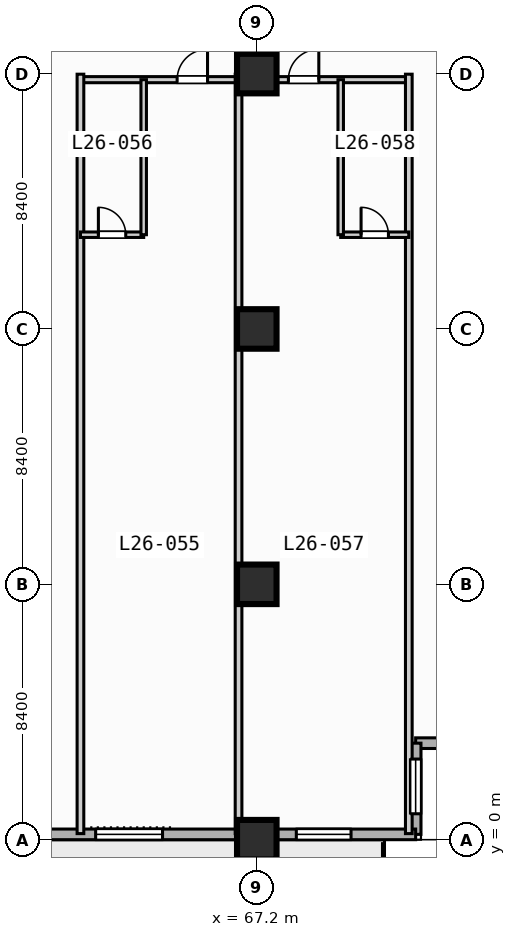
"""IFC4 building model, lengths in metres.
Left out: names, types, materials, properties, quantities, classifications, styles, units other than length and angle.
Written with IfcOpenShell. Run it as: python <this file> out.ifc"""

import sys

from ifc_helpers import new_model, si_unit, direction, frame, frame_2d, origin, origin_2d, place, context, subcontext, project, spatial, rectangle, extrude, element, fill, save


model = new_model("IFC4")
c1 = context("Model", 3, precision=1e-05, world=origin(), true_north=direction((0.0, 1.0)))
c2 = subcontext(c1, "Body", "Model", "MODEL_VIEW")
j1 = project(units=[si_unit("LENGTHUNIT", "METRE"), si_unit("PLANEANGLEUNIT", "RADIAN")], contexts=[c1])
p1 = place(None, origin())
s1 = spatial("IfcSite", under=j1, at=p1, CompositionType="ELEMENT")
p2 = place(p1, origin())
s2 = spatial("IfcBuilding", under=s1, at=p2, CompositionType="ELEMENT")
p3 = place(p2, frame((0.0, 0.0, 111.4)))
s3 = spatial("IfcBuildingStorey", under=s2, at=p3, CompositionType="ELEMENT", Elevation=111.4)
for number, where, z_axis, x_axis in (
    (1, (67.2, 0.0, 0.0), (0.0, 0.0, 1.0), (1.0, 0.0, 0.0)),
    (2, (67.2, 8.4, 0.0), (0.0, 0.0, 1.0), (1.0, 0.0, 0.0)),
    (3, (67.2, 16.8, 0.0), (0.0, 0.0, 1.0), (1.0, 0.0, 0.0)),
    (4, (67.2, 25.2, 0.0), (0.0, 0.0, 1.0), (1.0, 0.0, 0.0)),
):
    element("IfcColumn", number, at=place(p3, frame(where, z_axis=z_axis, x_axis=x_axis)), inside=s3, PredefinedType="COLUMN", context=c2, shape_type="SweptSolid", body=[
        extrude(rectangle(XDim=1.3, YDim=1.3, at=origin_2d()), origin(), (0.0, 0.0, 1.0), 3.8),
    ])
p4 = place(p3, frame((75.425, 3.175, 0.0), z_axis=(0.0, 0.0, 1.0), x_axis=(-1.0, 0.0, 0.0)))
e5 = element("IfcWall", 5, at=p4, inside=s3, PredefinedType="STANDARD", context=c2, shape_type="SweptSolid", body=[
    extrude(rectangle(XDim=3.0, YDim=0.35, at=frame_2d((1.5, 0.0))), origin(), (0.0, 0.0, 1.0), 3.55),
])
p5 = place(p3, frame((72.425, 3.175, 0.0), z_axis=(0.0, 0.0, 1.0), x_axis=(0.0, -1.0, 0.0)))
e6 = element("IfcWall", 6, at=p5, inside=s3, PredefinedType="STANDARD", context=c2, shape_type="SweptSolid", body=[
    extrude(rectangle(XDim=3.0, YDim=0.35, at=frame_2d((1.5, 0.0))), origin(), (0.0, 0.0, 1.0), 3.55),
])
p6 = place(p5, frame((0.522, 0.0, 0.85)))
e7 = element("IfcOpeningElement", 7, at=p6, cuts=e6, PredefinedType="OPENING", context=c2, shape_type="SweptSolid", body=[
    extrude(rectangle(XDim=1.8, YDim=1.8, at=frame_2d((0.9, 0.9))), frame((0.0, 0.185, 0.0), z_axis=(0.0, -1.0, 0.0), x_axis=(1.0, 0.0, 0.0)), (0.0, 0.0, 1.0), 0.37),
])
p7 = place(p3, frame((72.425, 0.175, 0.0), z_axis=(0.0, 0.0, 1.0), x_axis=(-1.0, 0.0, 0.0)))
e8 = element("IfcWall", 8, at=p7, inside=s3, PredefinedType="STANDARD", context=c2, shape_type="SweptSolid", body=[
    extrude(rectangle(XDim=69.25, YDim=0.35, at=frame_2d((34.625, 0.0))), origin(), (0.0, 0.0, 1.0), 3.55),
])
p8 = place(p7, frame((50.725, 0.0, 0.0)))
e9 = element("IfcOpeningElement", 9, at=p8, cuts=e8, PredefinedType="OPENING", context=c2, shape_type="SweptSolid", body=[
    extrude(rectangle(XDim=1.4, YDim=2.2, at=frame_2d((0.7, 1.1))), frame((0.0, 0.185, 0.0), z_axis=(0.0, -1.0, 0.0), x_axis=(1.0, 0.0, 0.0)), (0.0, 0.0, 1.0), 0.37),
])
p9 = place(p7, frame((58.725, 0.0, 0.85)))
e10 = element("IfcOpeningElement", 10, at=p9, cuts=e8, PredefinedType="OPENING", context=c2, shape_type="SweptSolid", body=[
    extrude(rectangle(XDim=2.2, YDim=1.8, at=frame_2d((1.1, 0.9))), frame((0.0, 0.185, 0.0), z_axis=(0.0, -1.0, 0.0), x_axis=(1.0, 0.0, 0.0)), (0.0, 0.0, 1.0), 0.37),
])
p10 = place(p7, frame((41.925, 0.0, 0.85)))
e11 = element("IfcOpeningElement", 11, at=p10, cuts=e8, PredefinedType="OPENING", context=c2, shape_type="SweptSolid", body=[
    extrude(rectangle(XDim=2.2, YDim=1.8, at=frame_2d((1.1, 0.9))), frame((0.0, 0.185, 0.0), z_axis=(0.0, -1.0, 0.0), x_axis=(1.0, 0.0, 0.0)), (0.0, 0.0, 1.0), 0.37),
])
p11 = place(p7, frame((33.525, 0.0, 0.85)))
e12 = element("IfcOpeningElement", 12, at=p11, cuts=e8, PredefinedType="OPENING", context=c2, shape_type="SweptSolid", body=[
    extrude(rectangle(XDim=2.2, YDim=1.8, at=frame_2d((1.1, 0.9))), frame((0.0, 0.185, 0.0), z_axis=(0.0, -1.0, 0.0), x_axis=(1.0, 0.0, 0.0)), (0.0, 0.0, 1.0), 0.37),
])
p12 = place(p7, frame((25.125, 0.0, 0.85)))
e13 = element("IfcOpeningElement", 13, at=p12, cuts=e8, PredefinedType="OPENING", context=c2, shape_type="SweptSolid", body=[
    extrude(rectangle(XDim=2.2, YDim=1.8, at=frame_2d((1.1, 0.9))), frame((0.0, 0.185, 0.0), z_axis=(0.0, -1.0, 0.0), x_axis=(1.0, 0.0, 0.0)), (0.0, 0.0, 1.0), 0.37),
])
p13 = place(p7, frame((8.325, 0.0, 0.85)))
e14 = element("IfcOpeningElement", 14, at=p13, cuts=e8, PredefinedType="OPENING", context=c2, shape_type="SweptSolid", body=[
    extrude(rectangle(XDim=2.2, YDim=1.8, at=frame_2d((1.1, 0.9))), frame((0.0, 0.185, 0.0), z_axis=(0.0, -1.0, 0.0), x_axis=(1.0, 0.0, 0.0)), (0.0, 0.0, 1.0), 0.37),
])
p14 = place(p7, frame((2.125, 0.0, 0.85)))
e15 = element("IfcOpeningElement", 15, at=p14, cuts=e8, PredefinedType="OPENING", context=c2, shape_type="SweptSolid", body=[
    extrude(rectangle(XDim=1.8, YDim=1.8, at=frame_2d((0.9, 0.9))), frame((0.0, 0.185, 0.0), z_axis=(0.0, -1.0, 0.0), x_axis=(1.0, 0.0, 0.0)), (0.0, 0.0, 1.0), 0.37),
])
p15 = place(p3, frame((61.4, 25.0, 0.0), z_axis=(0.0, 0.0, 1.0), x_axis=(1.0, 0.0, 0.0)))
e16 = element("IfcWall", 16, at=p15, inside=s3, PredefinedType="PARTITIONING", context=c2, shape_type="SweptSolid", body=[
    extrude(rectangle(XDim=10.8, YDim=0.2, at=frame_2d((5.4, 0.0))), origin(), (0.0, 0.0, 1.0), 2.8),
])
p16 = place(p15, frame((3.18, 0.0, 0.0)))
e17 = element("IfcOpeningElement", 17, at=p16, cuts=e16, PredefinedType="OPENING", context=c2, shape_type="SweptSolid", body=[
    extrude(rectangle(XDim=1.0, YDim=2.15, at=frame_2d((0.5, 1.075))), frame((0.0, 0.11, 0.0), z_axis=(0.0, -1.0, 0.0), x_axis=(1.0, 0.0, 0.0)), (0.0, 0.0, 1.0), 0.22),
])
p17 = place(p15, frame((6.84, 0.0, 0.0)))
e18 = element("IfcOpeningElement", 18, at=p17, cuts=e16, PredefinedType="OPENING", context=c2, shape_type="SweptSolid", body=[
    extrude(rectangle(XDim=1.0, YDim=2.15, at=frame_2d((0.5, 1.075))), frame((0.0, 0.11, 0.0), z_axis=(0.0, -1.0, 0.0), x_axis=(1.0, 0.0, 0.0)), (0.0, 0.0, 1.0), 0.22),
])
p18 = place(p3, frame((61.4, 0.2, 0.0), z_axis=(0.0, 0.0, 1.0), x_axis=(0.0, 1.0, 0.0)))
e19 = element("IfcWall", 19, at=p18, inside=s3, PredefinedType="PARTITIONING", context=c2, shape_type="SweptSolid", body=[
    extrude(rectangle(XDim=24.98, YDim=0.22, at=frame_2d((12.49, 0.0))), origin(), (0.0, 0.0, 1.0), 3.55),
])
p19 = place(p3, frame((61.4, 19.9, 0.0), z_axis=(0.0, 0.0, 1.0), x_axis=(1.0, 0.0, 0.0)))
e20 = element("IfcWall", 20, at=p19, inside=s3, PredefinedType="PLUMBINGWALL", context=c2, shape_type="SweptSolid", body=[
    extrude(rectangle(XDim=2.08, YDim=0.18, at=frame_2d((1.04, 0.0))), origin(), (0.0, 0.0, 1.0), 3.55),
])
p20 = place(p19, frame((0.59, 0.0, 0.0)))
e21 = element("IfcOpeningElement", 21, at=p20, cuts=e20, PredefinedType="OPENING", context=c2, shape_type="SweptSolid", body=[
    extrude(rectangle(XDim=0.9, YDim=2.1, at=frame_2d((0.45, 1.05))), frame((0.0, 0.1, 0.0), z_axis=(0.0, -1.0, 0.0), x_axis=(1.0, 0.0, 0.0)), (0.0, 0.0, 1.0), 0.2),
])
p21 = place(p3, frame((63.48, 19.9, 0.0), z_axis=(0.0, 0.0, 1.0), x_axis=(0.0, 1.0, 0.0)))
e22 = element("IfcWall", 22, at=p21, inside=s3, PredefinedType="PLUMBINGWALL", context=c2, shape_type="SweptSolid", body=[
    extrude(rectangle(XDim=5.1, YDim=0.18, at=frame_2d((2.55, 0.0))), origin(), (0.0, 0.0, 1.0), 3.55),
])
for number, where, z_axis, x_axis in (
    (23, (66.6, 0.2, 0.0), (0.0, 0.0, 1.0), (0.0, 1.0, 0.0)),
    (24, (72.2, 0.2, 0.0), (0.0, 0.0, 1.0), (0.0, 1.0, 0.0)),
):
    element("IfcWall", number, at=place(p3, frame(where, z_axis=z_axis, x_axis=x_axis)), inside=s3, PredefinedType="PARTITIONING", context=c2, shape_type="SweptSolid", body=[
        extrude(rectangle(XDim=24.98, YDim=0.22, at=frame_2d((12.49, 0.0))), origin(), (0.0, 0.0, 1.0), 3.55),
    ])
p22 = place(p3, frame((69.96, 19.9, 0.0), z_axis=(0.0, 0.0, 1.0), x_axis=(1.0, 0.0, 0.0)))
e25 = element("IfcWall", 25, at=p22, inside=s3, PredefinedType="PLUMBINGWALL", context=c2, shape_type="SweptSolid", body=[
    extrude(rectangle(XDim=2.24, YDim=0.18, at=frame_2d((1.12, 0.0))), origin(), (0.0, 0.0, 1.0), 3.55),
])
p23 = place(p22, frame((0.67, 0.0, 0.0)))
e26 = element("IfcOpeningElement", 26, at=p23, cuts=e25, PredefinedType="OPENING", context=c2, shape_type="SweptSolid", body=[
    extrude(rectangle(XDim=0.9, YDim=2.1, at=frame_2d((0.45, 1.05))), frame((0.0, 0.1, 0.0), z_axis=(0.0, -1.0, 0.0), x_axis=(1.0, 0.0, 0.0)), (0.0, 0.0, 1.0), 0.2),
])
p24 = place(p3, frame((69.96, 19.9, 0.0), z_axis=(0.0, 0.0, 1.0), x_axis=(0.0, 1.0, 0.0)))
e27 = element("IfcWall", 27, at=p24, inside=s3, PredefinedType="PLUMBINGWALL", context=c2, shape_type="SweptSolid", body=[
    extrude(rectangle(XDim=5.1, YDim=0.18, at=frame_2d((2.55, 0.0))), origin(), (0.0, 0.0, 1.0), 3.55),
])
p25 = place(p6, origin())
e28 = element("IfcWindow", 28, at=p25, inside=s3, PartitioningType="SINGLE_PANEL", PredefinedType="WINDOW", context=c2, shape_type="SweptSolid", body=[
    extrude(rectangle(XDim=1.8, YDim=1.8, at=frame_2d((0.9, 0.9))), frame((0.0, 0.03, 0.0), z_axis=(0.0, -1.0, 0.0), x_axis=(1.0, 0.0, 0.0)), (0.0, 0.0, 1.0), 0.06),
])
fill(e7, e28)
p26 = place(p13, origin())
e29 = element("IfcWindow", 29, at=p26, inside=s3, PartitioningType="SINGLE_PANEL", PredefinedType="WINDOW", context=c2, shape_type="SweptSolid", body=[
    extrude(rectangle(XDim=2.2, YDim=1.8, at=frame_2d((1.1, 0.9))), frame((0.0, 0.03, 0.0), z_axis=(0.0, -1.0, 0.0), x_axis=(1.0, 0.0, 0.0)), (0.0, 0.0, 1.0), 0.06),
])
fill(e14, e29)
p27 = place(p14, origin())
e30 = element("IfcWindow", 30, at=p27, inside=s3, PartitioningType="SINGLE_PANEL", PredefinedType="WINDOW", context=c2, shape_type="SweptSolid", body=[
    extrude(rectangle(XDim=1.8, YDim=1.8, at=frame_2d((0.9, 0.9))), frame((0.0, 0.03, 0.0), z_axis=(0.0, -1.0, 0.0), x_axis=(1.0, 0.0, 0.0)), (0.0, 0.0, 1.0), 0.06),
])
fill(e15, e30)
p28 = place(p16, origin())
e31 = element("IfcDoor", 31, at=p28, inside=s3, OperationType="SINGLE_SWING_RIGHT", PredefinedType="DOOR", context=c2, shape_type="SweptSolid", body=[
    extrude(rectangle(XDim=1.0, YDim=2.15, at=frame_2d((0.5, 1.075))), frame((0.0, 0.025, 0.0), z_axis=(0.0, -1.0, 0.0), x_axis=(1.0, 0.0, 0.0)), (0.0, 0.0, 1.0), 0.05),
])
fill(e17, e31)
p29 = place(p17, origin())
e32 = element("IfcDoor", 32, at=p29, inside=s3, OperationType="SINGLE_SWING_RIGHT", PredefinedType="DOOR", context=c2, shape_type="SweptSolid", body=[
    extrude(rectangle(XDim=1.0, YDim=2.15, at=frame_2d((0.5, 1.075))), frame((0.0, 0.025, 0.0), z_axis=(0.0, -1.0, 0.0), x_axis=(1.0, 0.0, 0.0)), (0.0, 0.0, 1.0), 0.05),
])
fill(e18, e32)
p30 = place(p20, origin())
e33 = element("IfcDoor", 33, at=p30, inside=s3, OperationType="SINGLE_SWING_LEFT", PredefinedType="DOOR", context=c2, shape_type="SweptSolid", body=[
    extrude(rectangle(XDim=0.9, YDim=2.1, at=frame_2d((0.45, 1.05))), frame((0.0, 0.025, 0.0), z_axis=(0.0, -1.0, 0.0), x_axis=(1.0, 0.0, 0.0)), (0.0, 0.0, 1.0), 0.05),
])
fill(e21, e33)
p31 = place(p23, origin())
e34 = element("IfcDoor", 34, at=p31, inside=s3, OperationType="SINGLE_SWING_LEFT", PredefinedType="DOOR", context=c2, shape_type="SweptSolid", body=[
    extrude(rectangle(XDim=0.9, YDim=2.1, at=frame_2d((0.45, 1.05))), frame((0.0, 0.025, 0.0), z_axis=(0.0, -1.0, 0.0), x_axis=(1.0, 0.0, 0.0)), (0.0, 0.0, 1.0), 0.05),
])
fill(e26, e34)
save(model, sys.argv[1])
